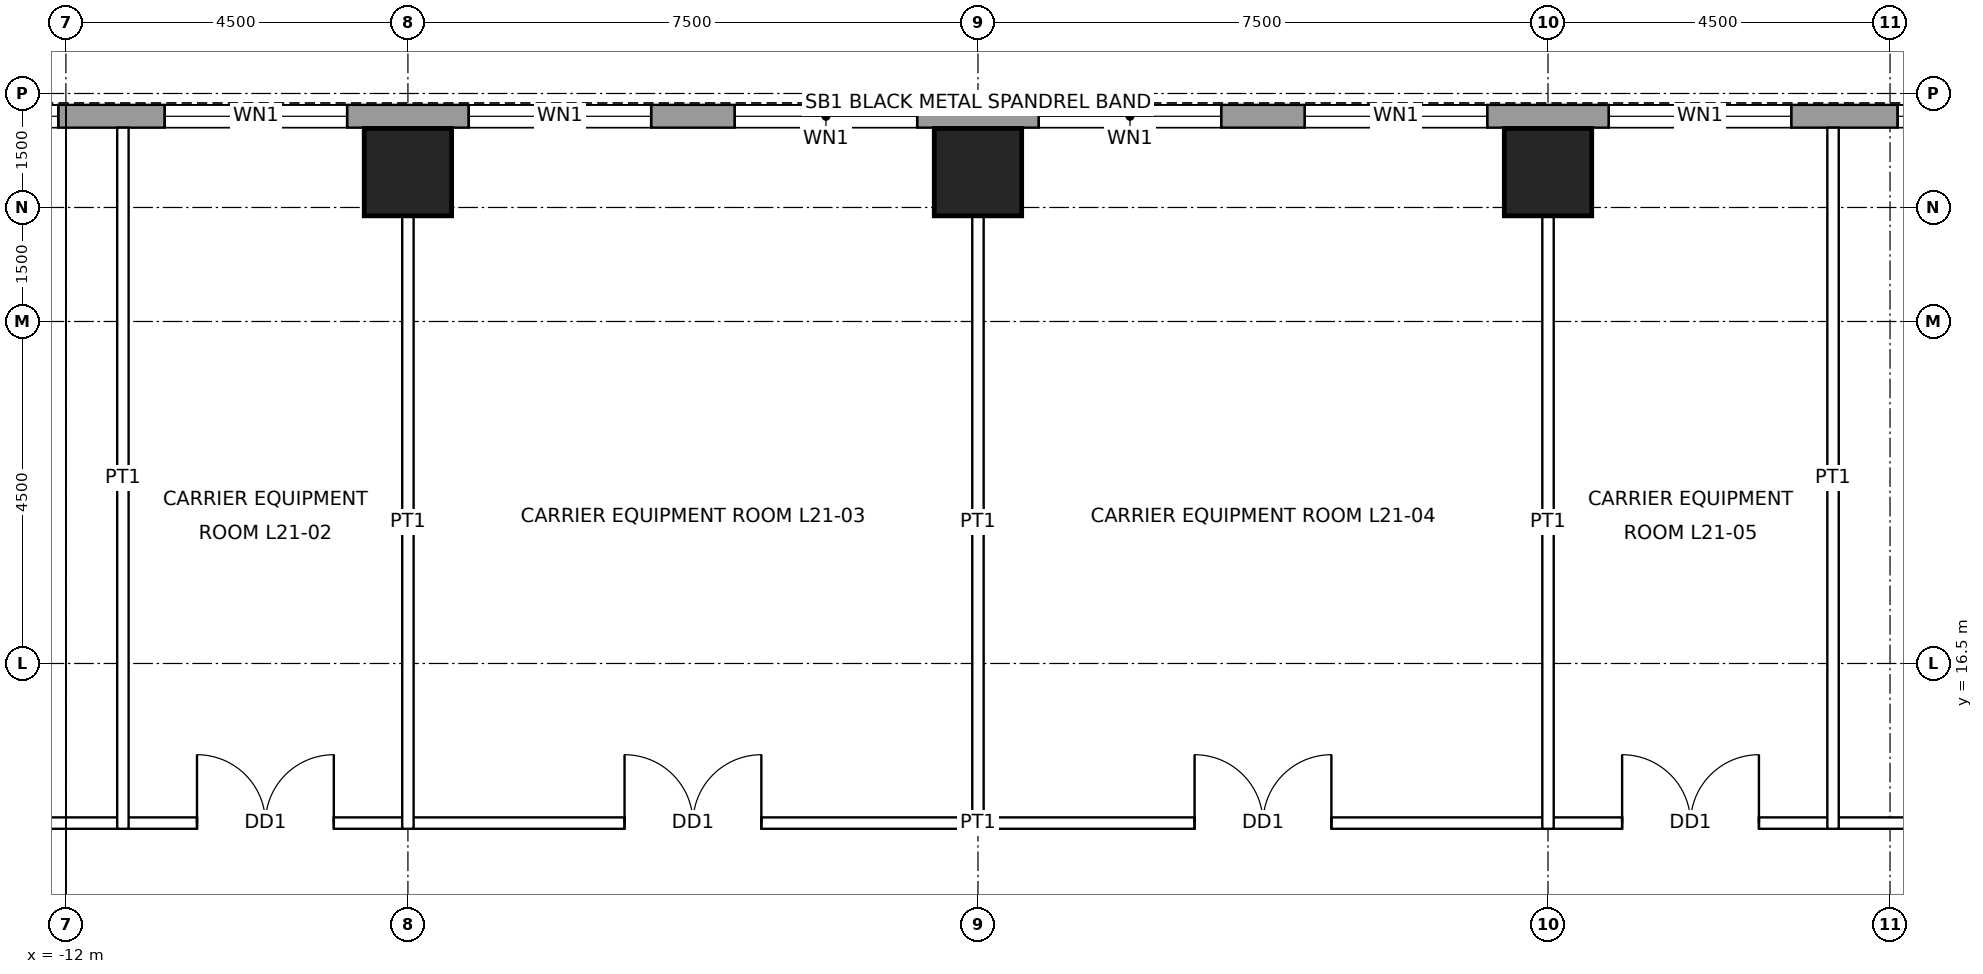
"""IFC4 building model, lengths in metres.
Left out: names, types, materials, properties, quantities, classifications, styles, units other than length and angle.
Written with IfcOpenShell. Run it as: python <this file> out.ifc"""

import sys

from ifc_helpers import new_model, si_unit, direction, frame, frame_2d, origin, origin_2d, place, context, subcontext, project, spatial, rectangle, hollow_rectangle, extrude, element, fill, save


model = new_model("IFC4")
c1 = context("Model", 3, precision=1e-05, world=origin(), true_north=direction((0.0, 1.0)))
c2 = subcontext(c1, "Body", "Model", "MODEL_VIEW")
j1 = project(units=[si_unit("LENGTHUNIT", "METRE"), si_unit("PLANEANGLEUNIT", "RADIAN")], contexts=[c1])
p1 = place(None, origin())
s1 = spatial("IfcSite", under=j1, at=p1, CompositionType="ELEMENT")
p2 = place(p1, origin())
s2 = spatial("IfcBuilding", under=s1, at=p2, CompositionType="ELEMENT")
p3 = place(p2, frame((0.0, 0.0, 108.9)))
s3 = spatial("IfcBuildingStorey", under=s2, at=p3, CompositionType="ELEMENT", Elevation=108.9)
for number, where, z_axis, x_axis in (
    (1, (-7.5, 22.965, 0.0), (0.0, 0.0, 1.0), (1.0, 0.0, 0.0)),
    (2, (0.0, 22.965, 0.0), (0.0, 0.0, 1.0), (1.0, 0.0, 0.0)),
    (3, (7.5, 22.965, 0.0), (0.0, 0.0, 1.0), (1.0, 0.0, 0.0)),
):
    element("IfcColumn", number, at=place(p3, frame(where, z_axis=z_axis, x_axis=x_axis)), inside=s3, PredefinedType="COLUMN", context=c2, shape_type="SweptSolid", body=[
        extrude(hollow_rectangle(XDim=1.15, YDim=1.15, WallThickness=0.075, at=origin_2d()), origin(), (0.0, 0.0, 1.0), 4.5),
    ])
p4 = place(p3, frame((-16.2, 23.7, 0.0), z_axis=(0.0, 0.0, 1.0), x_axis=(1.0, 0.0, 0.0)))
e4 = element("IfcWall", 4, at=p4, inside=s3, PredefinedType="SOLIDWALL", context=c2, shape_type="SweptSolid", body=[
    extrude(rectangle(XDim=32.4, YDim=0.3, at=frame_2d((16.2, 0.0))), origin(), (0.0, 0.0, 1.0), 4.3),
])
p5 = place(p4, frame((2.3, 0.0, 1.0)))
e5 = element("IfcOpeningElement", 5, at=p5, cuts=e4, PredefinedType="OPENING", context=c2, shape_type="SweptSolid", body=[
    extrude(rectangle(XDim=1.8, YDim=1.2, at=frame_2d((0.9, 0.6))), frame((0.0, 0.16, 0.0), z_axis=(0.0, -1.0, 0.0), x_axis=(1.0, 0.0, 0.0)), (0.0, 0.0, 1.0), 0.32),
])
p6 = place(p4, frame((5.5, 0.0, 1.0)))
e6 = element("IfcOpeningElement", 6, at=p6, cuts=e4, PredefinedType="OPENING", context=c2, shape_type="SweptSolid", body=[
    extrude(rectangle(XDim=2.4, YDim=1.2, at=frame_2d((1.2, 0.6))), frame((0.0, 0.16, 0.0), z_axis=(0.0, -1.0, 0.0), x_axis=(1.0, 0.0, 0.0)), (0.0, 0.0, 1.0), 0.32),
])
p7 = place(p4, frame((9.5, 0.0, 1.0)))
e7 = element("IfcOpeningElement", 7, at=p7, cuts=e4, PredefinedType="OPENING", context=c2, shape_type="SweptSolid", body=[
    extrude(rectangle(XDim=2.4, YDim=1.2, at=frame_2d((1.2, 0.6))), frame((0.0, 0.16, 0.0), z_axis=(0.0, -1.0, 0.0), x_axis=(1.0, 0.0, 0.0)), (0.0, 0.0, 1.0), 0.32),
])
p8 = place(p4, frame((13.0, 0.0, 1.0)))
e8 = element("IfcOpeningElement", 8, at=p8, cuts=e4, PredefinedType="OPENING", context=c2, shape_type="SweptSolid", body=[
    extrude(rectangle(XDim=2.4, YDim=1.2, at=frame_2d((1.2, 0.6))), frame((0.0, 0.16, 0.0), z_axis=(0.0, -1.0, 0.0), x_axis=(1.0, 0.0, 0.0)), (0.0, 0.0, 1.0), 0.32),
])
p9 = place(p4, frame((17.0, 0.0, 1.0)))
e9 = element("IfcOpeningElement", 9, at=p9, cuts=e4, PredefinedType="OPENING", context=c2, shape_type="SweptSolid", body=[
    extrude(rectangle(XDim=2.4, YDim=1.2, at=frame_2d((1.2, 0.6))), frame((0.0, 0.16, 0.0), z_axis=(0.0, -1.0, 0.0), x_axis=(1.0, 0.0, 0.0)), (0.0, 0.0, 1.0), 0.32),
])
p10 = place(p4, frame((20.5, 0.0, 1.0)))
e10 = element("IfcOpeningElement", 10, at=p10, cuts=e4, PredefinedType="OPENING", context=c2, shape_type="SweptSolid", body=[
    extrude(rectangle(XDim=2.4, YDim=1.2, at=frame_2d((1.2, 0.6))), frame((0.0, 0.16, 0.0), z_axis=(0.0, -1.0, 0.0), x_axis=(1.0, 0.0, 0.0)), (0.0, 0.0, 1.0), 0.32),
])
p11 = place(p4, frame((24.5, 0.0, 1.0)))
e11 = element("IfcOpeningElement", 11, at=p11, cuts=e4, PredefinedType="OPENING", context=c2, shape_type="SweptSolid", body=[
    extrude(rectangle(XDim=2.4, YDim=1.2, at=frame_2d((1.2, 0.6))), frame((0.0, 0.16, 0.0), z_axis=(0.0, -1.0, 0.0), x_axis=(1.0, 0.0, 0.0)), (0.0, 0.0, 1.0), 0.32),
])
p12 = place(p4, frame((28.3, 0.0, 1.0)))
e12 = element("IfcOpeningElement", 12, at=p12, cuts=e4, PredefinedType="OPENING", context=c2, shape_type="SweptSolid", body=[
    extrude(rectangle(XDim=1.8, YDim=1.2, at=frame_2d((0.9, 0.6))), frame((0.0, 0.16, 0.0), z_axis=(0.0, -1.0, 0.0), x_axis=(1.0, 0.0, 0.0)), (0.0, 0.0, 1.0), 0.32),
])
p13 = place(p3, frame((-14.475, 14.4, 0.0), z_axis=(0.0, 0.0, 1.0), x_axis=(1.0, 0.0, 0.0)))
e13 = element("IfcWall", 13, at=p13, inside=s3, PredefinedType="PARTITIONING", context=c2, shape_type="SweptSolid", body=[
    extrude(rectangle(XDim=28.95, YDim=0.15, at=frame_2d((14.475, 0.0))), origin(), (0.0, 0.0, 1.0), 4.3),
])
p14 = place(p13, frame((4.2, 0.0, 0.0)))
e14 = element("IfcOpeningElement", 14, at=p14, cuts=e13, PredefinedType="OPENING", context=c2, shape_type="SweptSolid", body=[
    extrude(rectangle(XDim=1.8, YDim=2.4, at=frame_2d((0.9, 1.2))), frame((0.0, 0.085, 0.0), z_axis=(0.0, -1.0, 0.0), x_axis=(1.0, 0.0, 0.0)), (0.0, 0.0, 1.0), 0.17),
])
p15 = place(p13, frame((9.825, 0.0, 0.0)))
e15 = element("IfcOpeningElement", 15, at=p15, cuts=e13, PredefinedType="OPENING", context=c2, shape_type="SweptSolid", body=[
    extrude(rectangle(XDim=1.8, YDim=2.4, at=frame_2d((0.9, 1.2))), frame((0.0, 0.085, 0.0), z_axis=(0.0, -1.0, 0.0), x_axis=(1.0, 0.0, 0.0)), (0.0, 0.0, 1.0), 0.17),
])
p16 = place(p13, frame((17.325, 0.0, 0.0)))
e16 = element("IfcOpeningElement", 16, at=p16, cuts=e13, PredefinedType="OPENING", context=c2, shape_type="SweptSolid", body=[
    extrude(rectangle(XDim=1.8, YDim=2.4, at=frame_2d((0.9, 1.2))), frame((0.0, 0.085, 0.0), z_axis=(0.0, -1.0, 0.0), x_axis=(1.0, 0.0, 0.0)), (0.0, 0.0, 1.0), 0.17),
])
p17 = place(p13, frame((22.95, 0.0, 0.0)))
e17 = element("IfcOpeningElement", 17, at=p17, cuts=e13, PredefinedType="OPENING", context=c2, shape_type="SweptSolid", body=[
    extrude(rectangle(XDim=1.8, YDim=2.4, at=frame_2d((0.9, 1.2))), frame((0.0, 0.085, 0.0), z_axis=(0.0, -1.0, 0.0), x_axis=(1.0, 0.0, 0.0)), (0.0, 0.0, 1.0), 0.17),
])
p18 = place(p13, frame((26.8, 0.0, 0.0)))
e18 = element("IfcOpeningElement", 18, at=p18, cuts=e13, PredefinedType="OPENING", context=c2, shape_type="SweptSolid", body=[
    extrude(rectangle(XDim=1.0, YDim=2.1, at=frame_2d((0.5, 1.05))), frame((0.0, 0.085, 0.0), z_axis=(0.0, -1.0, 0.0), x_axis=(1.0, 0.0, 0.0)), (0.0, 0.0, 1.0), 0.17),
])
p19 = place(p13, frame((1.15, 0.0, 0.0)))
e19 = element("IfcOpeningElement", 19, at=p19, cuts=e13, PredefinedType="OPENING", context=c2, shape_type="SweptSolid", body=[
    extrude(rectangle(XDim=1.0, YDim=2.1, at=frame_2d((0.5, 1.05))), frame((0.0, 0.085, 0.0), z_axis=(0.0, -1.0, 0.0), x_axis=(1.0, 0.0, 0.0)), (0.0, 0.0, 1.0), 0.17),
])
p20 = place(p3, frame((-11.25, 14.325, 0.0), z_axis=(0.0, 0.0, 1.0), x_axis=(0.0, 1.0, 0.0)))
e20 = element("IfcWall", 20, at=p20, inside=s3, PredefinedType="PARTITIONING", context=c2, shape_type="SweptSolid", body=[
    extrude(rectangle(XDim=9.225, YDim=0.15, at=frame_2d((4.613, 0.0))), origin(), (0.0, 0.0, 1.0), 3.431),
])
for number, where, z_axis, x_axis in (
    (21, (-7.5, 14.325, 0.0), (0.0, 0.0, 1.0), (0.0, 1.0, 0.0)),
    (22, (0.0, 14.325, 0.0), (0.0, 0.0, 1.0), (0.0, 1.0, 0.0)),
    (23, (7.5, 14.325, 0.0), (0.0, 0.0, 1.0), (0.0, 1.0, 0.0)),
):
    element("IfcWall", number, at=place(p3, frame(where, z_axis=z_axis, x_axis=x_axis)), inside=s3, PredefinedType="PARTITIONING", context=c2, shape_type="SweptSolid", body=[
        extrude(rectangle(XDim=8.065, YDim=0.15, at=frame_2d((4.032, 0.0))), origin(), (0.0, 0.0, 1.0), 3.431),
    ])
p21 = place(p3, frame((11.25, 14.325, 0.0), z_axis=(0.0, 0.0, 1.0), x_axis=(0.0, 1.0, 0.0)))
e24 = element("IfcWall", 24, at=p21, inside=s3, PredefinedType="PARTITIONING", context=c2, shape_type="SweptSolid", body=[
    extrude(rectangle(XDim=9.225, YDim=0.15, at=frame_2d((4.613, 0.0))), origin(), (0.0, 0.0, 1.0), 3.431),
])
p22 = place(p5, origin())
e25 = element("IfcWindow", 25, at=p22, inside=s3, PartitioningType="SINGLE_PANEL", PredefinedType="WINDOW", context=c2, shape_type="SweptSolid", body=[
    extrude(rectangle(XDim=1.8, YDim=1.2, at=frame_2d((0.9, 0.6))), frame((0.0, 0.03, 0.0), z_axis=(0.0, -1.0, 0.0), x_axis=(1.0, 0.0, 0.0)), (0.0, 0.0, 1.0), 0.06),
])
fill(e5, e25)
p23 = place(p6, origin())
e26 = element("IfcWindow", 26, at=p23, inside=s3, PartitioningType="SINGLE_PANEL", PredefinedType="WINDOW", context=c2, shape_type="SweptSolid", body=[
    extrude(rectangle(XDim=2.4, YDim=1.2, at=frame_2d((1.2, 0.6))), frame((0.0, 0.03, 0.0), z_axis=(0.0, -1.0, 0.0), x_axis=(1.0, 0.0, 0.0)), (0.0, 0.0, 1.0), 0.06),
])
fill(e6, e26)
p24 = place(p7, origin())
e27 = element("IfcWindow", 27, at=p24, inside=s3, PartitioningType="SINGLE_PANEL", PredefinedType="WINDOW", context=c2, shape_type="SweptSolid", body=[
    extrude(rectangle(XDim=2.4, YDim=1.2, at=frame_2d((1.2, 0.6))), frame((0.0, 0.03, 0.0), z_axis=(0.0, -1.0, 0.0), x_axis=(1.0, 0.0, 0.0)), (0.0, 0.0, 1.0), 0.06),
])
fill(e7, e27)
p25 = place(p8, origin())
e28 = element("IfcWindow", 28, at=p25, inside=s3, PartitioningType="SINGLE_PANEL", PredefinedType="WINDOW", context=c2, shape_type="SweptSolid", body=[
    extrude(rectangle(XDim=2.4, YDim=1.2, at=frame_2d((1.2, 0.6))), frame((0.0, 0.03, 0.0), z_axis=(0.0, -1.0, 0.0), x_axis=(1.0, 0.0, 0.0)), (0.0, 0.0, 1.0), 0.06),
])
fill(e8, e28)
p26 = place(p9, origin())
e29 = element("IfcWindow", 29, at=p26, inside=s3, PartitioningType="SINGLE_PANEL", PredefinedType="WINDOW", context=c2, shape_type="SweptSolid", body=[
    extrude(rectangle(XDim=2.4, YDim=1.2, at=frame_2d((1.2, 0.6))), frame((0.0, 0.03, 0.0), z_axis=(0.0, -1.0, 0.0), x_axis=(1.0, 0.0, 0.0)), (0.0, 0.0, 1.0), 0.06),
])
fill(e9, e29)
p27 = place(p10, origin())
e30 = element("IfcWindow", 30, at=p27, inside=s3, PartitioningType="SINGLE_PANEL", PredefinedType="WINDOW", context=c2, shape_type="SweptSolid", body=[
    extrude(rectangle(XDim=2.4, YDim=1.2, at=frame_2d((1.2, 0.6))), frame((0.0, 0.03, 0.0), z_axis=(0.0, -1.0, 0.0), x_axis=(1.0, 0.0, 0.0)), (0.0, 0.0, 1.0), 0.06),
])
fill(e10, e30)
p28 = place(p11, origin())
e31 = element("IfcWindow", 31, at=p28, inside=s3, PartitioningType="SINGLE_PANEL", PredefinedType="WINDOW", context=c2, shape_type="SweptSolid", body=[
    extrude(rectangle(XDim=2.4, YDim=1.2, at=frame_2d((1.2, 0.6))), frame((0.0, 0.03, 0.0), z_axis=(0.0, -1.0, 0.0), x_axis=(1.0, 0.0, 0.0)), (0.0, 0.0, 1.0), 0.06),
])
fill(e11, e31)
p29 = place(p12, origin())
e32 = element("IfcWindow", 32, at=p29, inside=s3, PartitioningType="SINGLE_PANEL", PredefinedType="WINDOW", context=c2, shape_type="SweptSolid", body=[
    extrude(rectangle(XDim=1.8, YDim=1.2, at=frame_2d((0.9, 0.6))), frame((0.0, 0.03, 0.0), z_axis=(0.0, -1.0, 0.0), x_axis=(1.0, 0.0, 0.0)), (0.0, 0.0, 1.0), 0.06),
])
fill(e12, e32)
p30 = place(p14, origin())
e33 = element("IfcDoor", 33, at=p30, inside=s3, OperationType="DOUBLE_DOOR_SINGLE_SWING", PredefinedType="DOOR", context=c2, shape_type="SweptSolid", body=[
    extrude(rectangle(XDim=1.8, YDim=2.4, at=frame_2d((0.9, 1.2))), frame((0.0, 0.025, 0.0), z_axis=(0.0, -1.0, 0.0), x_axis=(1.0, 0.0, 0.0)), (0.0, 0.0, 1.0), 0.05),
])
fill(e14, e33)
p31 = place(p15, origin())
e34 = element("IfcDoor", 34, at=p31, inside=s3, OperationType="DOUBLE_DOOR_SINGLE_SWING", PredefinedType="DOOR", context=c2, shape_type="SweptSolid", body=[
    extrude(rectangle(XDim=1.8, YDim=2.4, at=frame_2d((0.9, 1.2))), frame((0.0, 0.025, 0.0), z_axis=(0.0, -1.0, 0.0), x_axis=(1.0, 0.0, 0.0)), (0.0, 0.0, 1.0), 0.05),
])
fill(e15, e34)
p32 = place(p16, origin())
e35 = element("IfcDoor", 35, at=p32, inside=s3, OperationType="DOUBLE_DOOR_SINGLE_SWING", PredefinedType="DOOR", context=c2, shape_type="SweptSolid", body=[
    extrude(rectangle(XDim=1.8, YDim=2.4, at=frame_2d((0.9, 1.2))), frame((0.0, 0.025, 0.0), z_axis=(0.0, -1.0, 0.0), x_axis=(1.0, 0.0, 0.0)), (0.0, 0.0, 1.0), 0.05),
])
fill(e16, e35)
p33 = place(p17, origin())
e36 = element("IfcDoor", 36, at=p33, inside=s3, OperationType="DOUBLE_DOOR_SINGLE_SWING", PredefinedType="DOOR", context=c2, shape_type="SweptSolid", body=[
    extrude(rectangle(XDim=1.8, YDim=2.4, at=frame_2d((0.9, 1.2))), frame((0.0, 0.025, 0.0), z_axis=(0.0, -1.0, 0.0), x_axis=(1.0, 0.0, 0.0)), (0.0, 0.0, 1.0), 0.05),
])
fill(e17, e36)
save(model, sys.argv[1])
